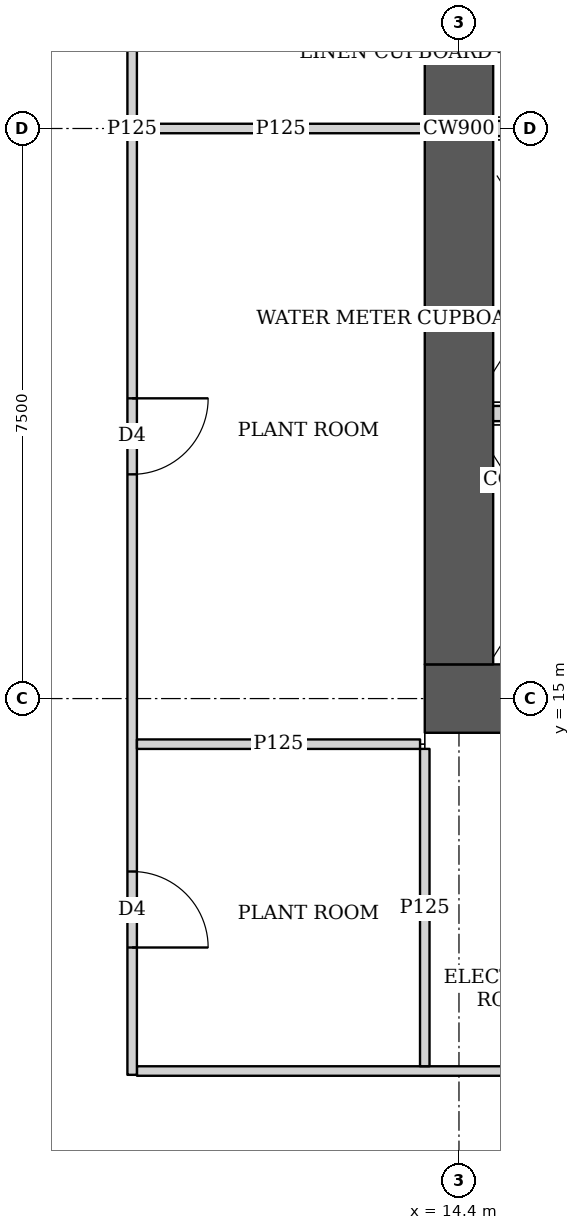
"""IFC4 building model, lengths in metres.
Left out: names, types, materials, properties, quantities, classifications, styles, units other than length and angle.
Written with IfcOpenShell. Run it as: python <this file> out.ifc"""

import sys

from ifc_helpers import new_model, si_unit, direction, frame, frame_2d, origin, place, context, subcontext, project, spatial, rectangle, extrude, element, fill, save


model = new_model("IFC4")
c1 = context("Model", 3, precision=1e-05, world=origin(), true_north=direction((0.0, 1.0)))
c2 = subcontext(c1, "Body", "Model", "MODEL_VIEW")
j1 = project(units=[si_unit("LENGTHUNIT", "METRE"), si_unit("PLANEANGLEUNIT", "RADIAN")], contexts=[c1])
p1 = place(None, origin())
s1 = spatial("IfcSite", under=j1, at=p1, CompositionType="ELEMENT")
p2 = place(p1, origin())
s2 = spatial("IfcBuilding", under=s1, at=p2, CompositionType="ELEMENT")
p3 = place(p2, frame((0.0, 0.0, 14.6)))
s3 = spatial("IfcBuildingStorey", under=s2, at=p3, CompositionType="ELEMENT", Elevation=14.6)
p4 = place(p3, frame((13.95, 15.0, 0.0), z_axis=(0.0, 0.0, 1.0), x_axis=(1.0, 0.0, 0.0)))
e1 = element("IfcWall", 1, at=p4, inside=s3, PredefinedType="SHEAR", context=c2, shape_type="SweptSolid", body=[
    extrude(rectangle(XDim=15.3, YDim=0.9, at=frame_2d((7.65, 0.0))), origin(), (0.0, 0.0, 1.0), 5.4),
])
p5 = place(p4, frame((4.45, 0.0, 0.0)))
e2 = element("IfcOpeningElement", 2, at=p5, cuts=e1, PredefinedType="OPENING", context=c2, shape_type="SweptSolid", body=[
    extrude(rectangle(XDim=1.8, YDim=2.1, at=frame_2d((0.9, 1.05))), frame((0.0, 0.46, 0.0), z_axis=(0.0, -1.0, 0.0), x_axis=(1.0, 0.0, 0.0)), (0.0, 0.0, 1.0), 0.92),
])
p6 = place(p4, frame((10.7, 0.0, 0.0)))
e3 = element("IfcOpeningElement", 3, at=p6, cuts=e1, PredefinedType="OPENING", context=c2, shape_type="SweptSolid", body=[
    extrude(rectangle(XDim=1.1, YDim=2.1, at=frame_2d((0.55, 1.05))), frame((0.0, 0.46, 0.0), z_axis=(0.0, -1.0, 0.0), x_axis=(1.0, 0.0, 0.0)), (0.0, 0.0, 1.0), 0.92),
])
p7 = place(p3, frame((14.4, 15.45, 0.0), z_axis=(0.0, 0.0, 1.0), x_axis=(0.0, 1.0, 0.0)))
e4 = element("IfcWall", 4, at=p7, inside=s3, PredefinedType="SHEAR", context=c2, shape_type="SweptSolid", body=[
    extrude(rectangle(XDim=14.1, YDim=0.9, at=frame_2d((7.05, 0.0))), origin(), (0.0, 0.0, 1.0), 5.4),
])
p8 = place(p3, frame((10.1, 10.05, 0.0), z_axis=(0.0, 0.0, 1.0), x_axis=(0.0, 1.0, 0.0)))
e5 = element("IfcWall", 5, at=p8, inside=s3, PredefinedType="PARTITIONING", context=c2, shape_type="SweptSolid", body=[
    extrude(rectangle(XDim=24.9, YDim=0.125, at=frame_2d((12.45, 0.0))), origin(), (0.0, 0.0, 1.0), 3.5),
])
p9 = place(p8, frame((1.675, 0.0, 0.0)))
e6 = element("IfcOpeningElement", 6, at=p9, cuts=e5, PredefinedType="OPENING", context=c2, shape_type="SweptSolid", body=[
    extrude(rectangle(XDim=1.0, YDim=2.1, at=frame_2d((0.5, 1.05))), frame((0.0, 0.073, 0.0), z_axis=(0.0, -1.0, 0.0), x_axis=(1.0, 0.0, 0.0)), (0.0, 0.0, 1.0), 0.145),
])
p10 = place(p8, frame((7.9, 0.0, 0.0)))
e7 = element("IfcOpeningElement", 7, at=p10, cuts=e5, PredefinedType="OPENING", context=c2, shape_type="SweptSolid", body=[
    extrude(rectangle(XDim=1.0, YDim=2.1, at=frame_2d((0.5, 1.05))), frame((0.0, 0.073, 0.0), z_axis=(0.0, -1.0, 0.0), x_axis=(1.0, 0.0, 0.0)), (0.0, 0.0, 1.0), 0.145),
])
p11 = place(p8, frame((16.0, 0.0, 0.0)))
e8 = element("IfcOpeningElement", 8, at=p11, cuts=e5, PredefinedType="OPENING", context=c2, shape_type="SweptSolid", body=[
    extrude(rectangle(XDim=1.0, YDim=2.1, at=frame_2d((0.5, 1.05))), frame((0.0, 0.073, 0.0), z_axis=(0.0, -1.0, 0.0), x_axis=(1.0, 0.0, 0.0)), (0.0, 0.0, 1.0), 0.145),
])
p12 = place(p8, frame((22.225, 0.0, 0.0)))
e9 = element("IfcOpeningElement", 9, at=p12, cuts=e5, PredefinedType="OPENING", context=c2, shape_type="SweptSolid", body=[
    extrude(rectangle(XDim=1.0, YDim=2.1, at=frame_2d((0.5, 1.05))), frame((0.0, 0.073, 0.0), z_axis=(0.0, -1.0, 0.0), x_axis=(1.0, 0.0, 0.0)), (0.0, 0.0, 1.0), 0.145),
])
p13 = place(p3, frame((10.163, 14.4, 0.0), z_axis=(0.0, 0.0, 1.0), x_axis=(1.0, 0.0, 0.0)))
e10 = element("IfcWall", 10, at=p13, inside=s3, PredefinedType="PARTITIONING", context=c2, shape_type="SweptSolid", body=[
    extrude(rectangle(XDim=3.725, YDim=0.125, at=frame_2d((1.862, 0.0))), origin(), (0.0, 0.0, 1.0), 3.5),
])
p14 = place(p3, frame((10.163, 22.5, 0.0), z_axis=(0.0, 0.0, 1.0), x_axis=(1.0, 0.0, 0.0)))
e11 = element("IfcWall", 11, at=p14, inside=s3, PredefinedType="PARTITIONING", context=c2, shape_type="SweptSolid", body=[
    extrude(rectangle(XDim=3.787, YDim=0.125, at=frame_2d((1.894, 0.0))), origin(), (0.0, 0.0, 1.0), 3.5),
])
p15 = place(p3, frame((13.95, 10.163, 0.0), z_axis=(0.0, 0.0, 1.0), x_axis=(0.0, 1.0, 0.0)))
e12 = element("IfcWall", 12, at=p15, inside=s3, PredefinedType="PARTITIONING", context=c2, shape_type="SweptSolid", body=[
    extrude(rectangle(XDim=4.175, YDim=0.125, at=frame_2d((2.087, 0.0))), origin(), (0.0, 0.0, 1.0), 3.5),
])
p16 = place(p3, frame((10.163, 10.1, 0.0), z_axis=(0.0, 0.0, 1.0), x_axis=(1.0, 0.0, 0.0)))
e13 = element("IfcWall", 13, at=p16, inside=s3, PredefinedType="PARTITIONING", context=c2, shape_type="SweptSolid", body=[
    extrude(rectangle(XDim=11.287, YDim=0.125, at=frame_2d((5.644, 0.0))), origin(), (0.0, 0.0, 1.0), 3.1),
])
p17 = place(p16, frame((7.832, 0.0, 0.0)))
e14 = element("IfcOpeningElement", 14, at=p17, cuts=e13, PredefinedType="OPENING", context=c2, shape_type="SweptSolid", body=[
    extrude(rectangle(XDim=1.8, YDim=2.1, at=frame_2d((0.9, 1.05))), frame((0.0, 0.073, 0.0), z_axis=(0.0, -1.0, 0.0), x_axis=(1.0, 0.0, 0.0)), (0.0, 0.0, 1.0), 0.145),
])
for number, where, z_axis, x_axis in (
    (15, (14.85, 18.75, 0.0), (0.0, 0.0, 1.0), (1.0, 0.0, 0.0)),
    (16, (14.85, 22.5, 0.0), (0.0, 0.0, 1.0), (1.0, 0.0, 0.0)),
):
    element("IfcWall", number, at=place(p3, frame(where, z_axis=z_axis, x_axis=x_axis)), inside=s3, PredefinedType="SOLIDWALL", context=c2, shape_type="SweptSolid", body=[
        extrude(rectangle(XDim=1.95, YDim=0.2, at=frame_2d((0.975, 0.0))), origin(), (0.0, 0.0, 1.0), 5.1),
    ])
p18 = place(p9, origin())
e17 = element("IfcDoor", 17, at=p18, inside=s3, OperationType="SINGLE_SWING_RIGHT", PredefinedType="DOOR", context=c2, shape_type="SweptSolid", body=[
    extrude(rectangle(XDim=1.0, YDim=2.1, at=frame_2d((0.5, 1.05))), frame((0.0, 0.025, 0.0), z_axis=(0.0, -1.0, 0.0), x_axis=(1.0, 0.0, 0.0)), (0.0, 0.0, 1.0), 0.05),
])
fill(e6, e17)
p19 = place(p10, origin())
e18 = element("IfcDoor", 18, at=p19, inside=s3, OperationType="SINGLE_SWING_LEFT", PredefinedType="DOOR", context=c2, shape_type="SweptSolid", body=[
    extrude(rectangle(XDim=1.0, YDim=2.1, at=frame_2d((0.5, 1.05))), frame((0.0, 0.025, 0.0), z_axis=(0.0, -1.0, 0.0), x_axis=(1.0, 0.0, 0.0)), (0.0, 0.0, 1.0), 0.05),
])
fill(e7, e18)
save(model, sys.argv[1])
